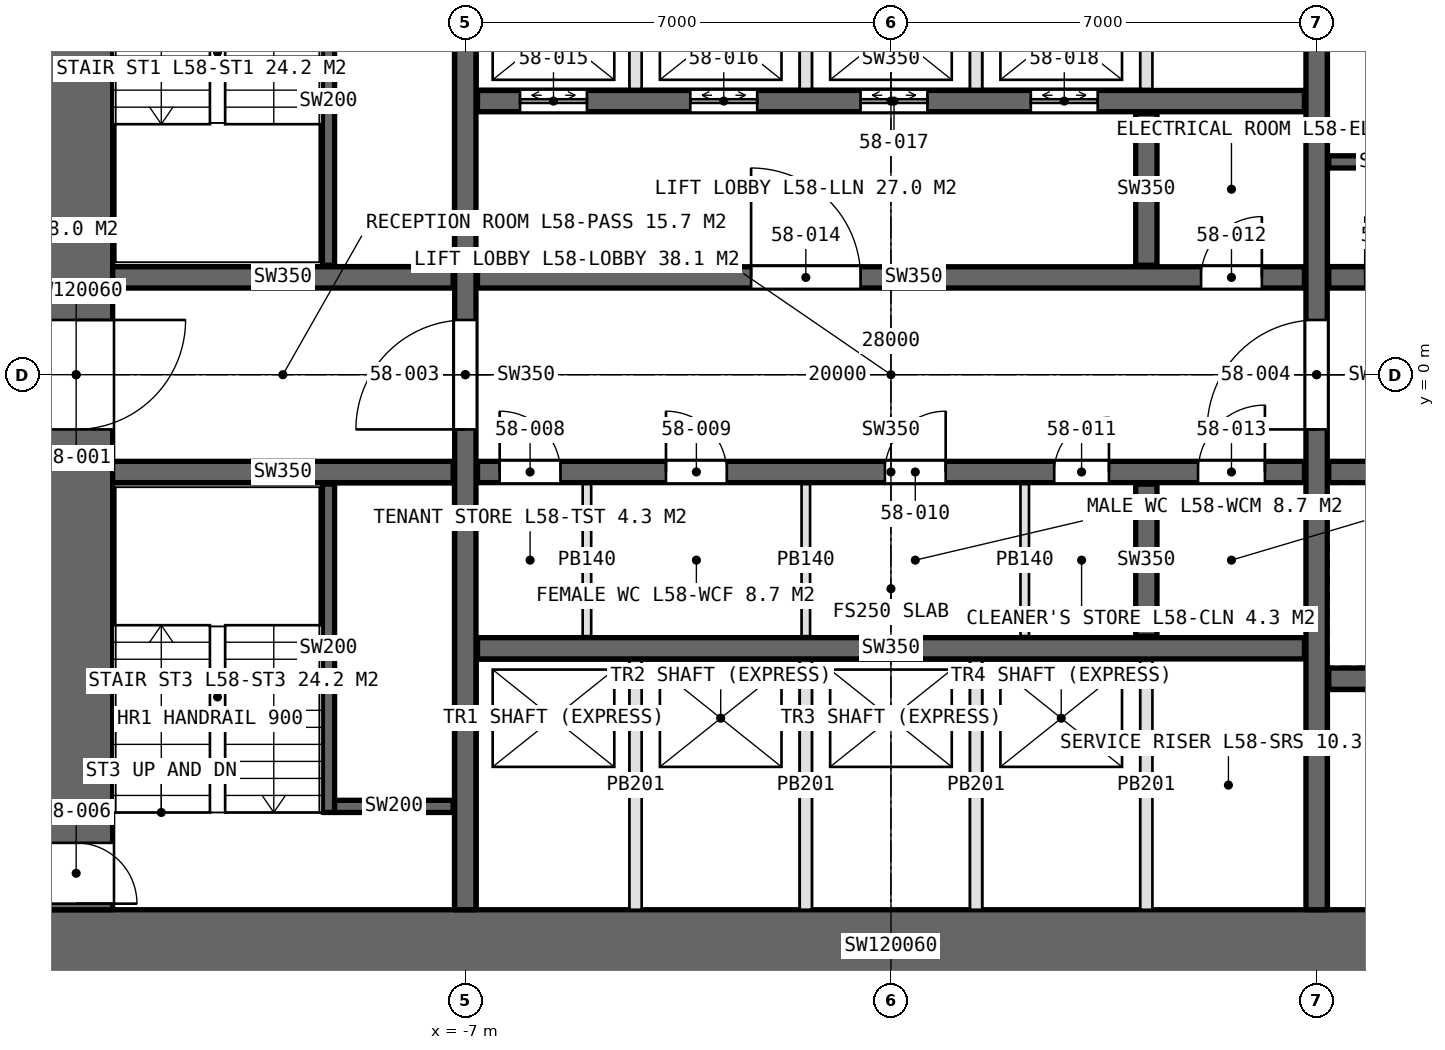
"""IFC4 building model, lengths in metres.
Left out: names, types, materials, properties, quantities, classifications, styles, units other than length and angle.
Written with IfcOpenShell. Run it as: python <this file> out.ifc"""

import sys

from ifc_helpers import new_model, si_unit, direction, frame, frame_2d, origin, place, context, subcontext, project, spatial, rectangle, extrude, element, fill, save


model = new_model("IFC4")
c1 = context("Model", 3, precision=1e-05, world=origin(), true_north=direction((0.0, 1.0)))
c2 = subcontext(c1, "Body", "Model", "MODEL_VIEW")
j1 = project(units=[si_unit("LENGTHUNIT", "METRE"), si_unit("PLANEANGLEUNIT", "RADIAN")], contexts=[c1])
p1 = place(None, origin())
s1 = spatial("IfcSite", under=j1, at=p1, CompositionType="ELEMENT")
p2 = place(p1, origin())
s2 = spatial("IfcBuilding", under=s1, at=p2, CompositionType="ELEMENT")
p3 = place(p2, frame((0.0, 0.0, 262.0)))
s3 = spatial("IfcBuildingStorey", under=s2, at=p3, CompositionType="ELEMENT", Elevation=262.0)
p4 = place(p3, frame((-14.0, -9.4, 0.0), z_axis=(0.0, 0.0, 1.0), x_axis=(1.0, 0.0, 0.0)))
e1 = element("IfcWall", 1, at=p4, inside=s3, PredefinedType="SHEAR", context=c2, shape_type="SweptSolid", body=[
    extrude(rectangle(XDim=28.0, YDim=1.2, at=frame_2d((14.0, 0.0))), origin(), (0.0, 0.0, 1.0), 4.2),
])
p5 = place(p4, frame((22.9, 0.0, 0.0)))
e2 = element("IfcOpeningElement", 2, at=p5, cuts=e1, PredefinedType="OPENING", context=c2, shape_type="SweptSolid", body=[
    extrude(rectangle(XDim=2.2, YDim=2.7, at=frame_2d((1.1, 1.35))), frame((0.0, 0.61, 0.0), z_axis=(0.0, -1.0, 0.0), x_axis=(1.0, 0.0, 0.0)), (0.0, 0.0, 1.0), 1.22),
])
p6 = place(p3, frame((-13.4, 8.8, 0.0), z_axis=(0.0, 0.0, 1.0), x_axis=(0.0, -1.0, 0.0)))
e3 = element("IfcWall", 3, at=p6, inside=s3, PredefinedType="SHEAR", context=c2, shape_type="SweptSolid", body=[
    extrude(rectangle(XDim=17.6, YDim=1.2, at=frame_2d((8.8, 0.0))), origin(), (0.0, 0.0, 1.0), 4.2),
])
p7 = place(p6, frame((7.9, 0.0, 0.0)))
e4 = element("IfcOpeningElement", 4, at=p7, cuts=e3, PredefinedType="OPENING", context=c2, shape_type="SweptSolid", body=[
    extrude(rectangle(XDim=1.8, YDim=2.4, at=frame_2d((0.9, 1.2))), frame((0.0, 0.61, 0.0), z_axis=(0.0, -1.0, 0.0), x_axis=(1.0, 0.0, 0.0)), (0.0, 0.0, 1.0), 1.22),
])
p8 = place(p6, frame((16.5, 0.0, 0.0)))
e5 = element("IfcOpeningElement", 5, at=p8, cuts=e3, PredefinedType="OPENING", context=c2, shape_type="SweptSolid", body=[
    extrude(rectangle(XDim=1.0, YDim=2.4, at=frame_2d((0.5, 1.2))), frame((0.0, 0.61, 0.0), z_axis=(0.0, -1.0, 0.0), x_axis=(1.0, 0.0, 0.0)), (0.0, 0.0, 1.0), 1.22),
])
p9 = place(p3, frame((-7.0, -8.8, 0.0), z_axis=(0.0, 0.0, 1.0), x_axis=(0.0, 1.0, 0.0)))
e6 = element("IfcWall", 6, at=p9, inside=s3, PredefinedType="SHEAR", context=c2, shape_type="SweptSolid", body=[
    extrude(rectangle(XDim=17.6, YDim=0.35, at=frame_2d((8.8, 0.0))), origin(), (0.0, 0.0, 1.0), 4.2),
])
p10 = place(p9, frame((7.9, 0.0, 0.0)))
e7 = element("IfcOpeningElement", 7, at=p10, cuts=e6, PredefinedType="OPENING", context=c2, shape_type="SweptSolid", body=[
    extrude(rectangle(XDim=1.8, YDim=2.4, at=frame_2d((0.9, 1.2))), frame((0.0, 0.185, 0.0), z_axis=(0.0, -1.0, 0.0), x_axis=(1.0, 0.0, 0.0)), (0.0, 0.0, 1.0), 0.37),
])
p11 = place(p3, frame((7.0, -8.8, 0.0), z_axis=(0.0, 0.0, 1.0), x_axis=(0.0, 1.0, 0.0)))
e8 = element("IfcWall", 8, at=p11, inside=s3, PredefinedType="SHEAR", context=c2, shape_type="SweptSolid", body=[
    extrude(rectangle(XDim=17.6, YDim=0.35, at=frame_2d((8.8, 0.0))), origin(), (0.0, 0.0, 1.0), 4.2),
])
p12 = place(p11, frame((7.9, 0.0, 0.0)))
e9 = element("IfcOpeningElement", 9, at=p12, cuts=e8, PredefinedType="OPENING", context=c2, shape_type="SweptSolid", body=[
    extrude(rectangle(XDim=1.8, YDim=2.4, at=frame_2d((0.9, 1.2))), frame((0.0, 0.185, 0.0), z_axis=(0.0, -1.0, 0.0), x_axis=(1.0, 0.0, 0.0)), (0.0, 0.0, 1.0), 0.37),
])
p13 = place(p3, frame((-6.8, 1.6, 0.0), z_axis=(0.0, 0.0, 1.0), x_axis=(1.0, 0.0, 0.0)))
e10 = element("IfcWall", 10, at=p13, inside=s3, PredefinedType="SHEAR", context=c2, shape_type="SweptSolid", body=[
    extrude(rectangle(XDim=13.6, YDim=0.35, at=frame_2d((6.8, 0.0))), origin(), (0.0, 0.0, 1.0), 4.2),
])
p14 = place(p13, frame((11.9, 0.0, 0.0)))
e11 = element("IfcOpeningElement", 11, at=p14, cuts=e10, PredefinedType="OPENING", context=c2, shape_type="SweptSolid", body=[
    extrude(rectangle(XDim=1.0, YDim=2.4, at=frame_2d((0.5, 1.2))), frame((0.0, 0.185, 0.0), z_axis=(0.0, -1.0, 0.0), x_axis=(1.0, 0.0, 0.0)), (0.0, 0.0, 1.0), 0.37),
])
p15 = place(p13, frame((4.5, 0.0, 0.0)))
e12 = element("IfcOpeningElement", 12, at=p15, cuts=e10, PredefinedType="OPENING", context=c2, shape_type="SweptSolid", body=[
    extrude(rectangle(XDim=1.8, YDim=2.4, at=frame_2d((0.9, 1.2))), frame((0.0, 0.185, 0.0), z_axis=(0.0, -1.0, 0.0), x_axis=(1.0, 0.0, 0.0)), (0.0, 0.0, 1.0), 0.37),
])
p16 = place(p3, frame((-6.8, -1.6, 0.0), z_axis=(0.0, 0.0, 1.0), x_axis=(1.0, 0.0, 0.0)))
e13 = element("IfcWall", 13, at=p16, inside=s3, PredefinedType="SHEAR", context=c2, shape_type="SweptSolid", body=[
    extrude(rectangle(XDim=13.6, YDim=0.35, at=frame_2d((6.8, 0.0))), origin(), (0.0, 0.0, 1.0), 4.2),
])
p17 = place(p16, frame((0.365, 0.0, 0.0)))
e14 = element("IfcOpeningElement", 14, at=p17, cuts=e13, PredefinedType="OPENING", context=c2, shape_type="SweptSolid", body=[
    extrude(rectangle(XDim=1.0, YDim=2.4, at=frame_2d((0.5, 1.2))), frame((0.0, 0.185, 0.0), z_axis=(0.0, -1.0, 0.0), x_axis=(1.0, 0.0, 0.0)), (0.0, 0.0, 1.0), 0.37),
])
p18 = place(p16, frame((3.1, 0.0, 0.0)))
e15 = element("IfcOpeningElement", 15, at=p18, cuts=e13, PredefinedType="OPENING", context=c2, shape_type="SweptSolid", body=[
    extrude(rectangle(XDim=1.0, YDim=2.4, at=frame_2d((0.5, 1.2))), frame((0.0, 0.185, 0.0), z_axis=(0.0, -1.0, 0.0), x_axis=(1.0, 0.0, 0.0)), (0.0, 0.0, 1.0), 0.37),
])
p19 = place(p16, frame((6.7, 0.0, 0.0)))
e16 = element("IfcOpeningElement", 16, at=p19, cuts=e13, PredefinedType="OPENING", context=c2, shape_type="SweptSolid", body=[
    extrude(rectangle(XDim=1.0, YDim=2.4, at=frame_2d((0.5, 1.2))), frame((0.0, 0.185, 0.0), z_axis=(0.0, -1.0, 0.0), x_axis=(1.0, 0.0, 0.0)), (0.0, 0.0, 1.0), 0.37),
])
p20 = place(p16, frame((9.485, 0.0, 0.0)))
e17 = element("IfcOpeningElement", 17, at=p20, cuts=e13, PredefinedType="OPENING", context=c2, shape_type="SweptSolid", body=[
    extrude(rectangle(XDim=0.9, YDim=2.4, at=frame_2d((0.45, 1.2))), frame((0.0, 0.185, 0.0), z_axis=(0.0, -1.0, 0.0), x_axis=(1.0, 0.0, 0.0)), (0.0, 0.0, 1.0), 0.37),
])
p21 = place(p16, frame((11.85, 0.0, 0.0)))
e18 = element("IfcOpeningElement", 18, at=p21, cuts=e13, PredefinedType="OPENING", context=c2, shape_type="SweptSolid", body=[
    extrude(rectangle(XDim=1.1, YDim=2.4, at=frame_2d((0.55, 1.2))), frame((0.0, 0.185, 0.0), z_axis=(0.0, -1.0, 0.0), x_axis=(1.0, 0.0, 0.0)), (0.0, 0.0, 1.0), 0.37),
])
p22 = place(p3, frame((-6.8, 4.5, 0.0), z_axis=(0.0, 0.0, 1.0), x_axis=(1.0, 0.0, 0.0)))
e19 = element("IfcWall", 19, at=p22, inside=s3, PredefinedType="SHEAR", context=c2, shape_type="SweptSolid", body=[
    extrude(rectangle(XDim=13.6, YDim=0.35, at=frame_2d((6.8, 0.0))), origin(), (0.0, 0.0, 1.0), 4.2),
])
p23 = place(p22, frame((0.7, 0.0, 0.0)))
e20 = element("IfcOpeningElement", 20, at=p23, cuts=e19, PredefinedType="OPENING", context=c2, shape_type="SweptSolid", body=[
    extrude(rectangle(XDim=1.1, YDim=2.4, at=frame_2d((0.55, 1.2))), frame((0.0, 0.185, 0.0), z_axis=(0.0, -1.0, 0.0), x_axis=(1.0, 0.0, 0.0)), (0.0, 0.0, 1.0), 0.37),
])
p24 = place(p22, frame((3.5, 0.0, 0.0)))
e21 = element("IfcOpeningElement", 21, at=p24, cuts=e19, PredefinedType="OPENING", context=c2, shape_type="SweptSolid", body=[
    extrude(rectangle(XDim=1.1, YDim=2.4, at=frame_2d((0.55, 1.2))), frame((0.0, 0.185, 0.0), z_axis=(0.0, -1.0, 0.0), x_axis=(1.0, 0.0, 0.0)), (0.0, 0.0, 1.0), 0.37),
])
p25 = place(p22, frame((6.3, 0.0, 0.0)))
e22 = element("IfcOpeningElement", 22, at=p25, cuts=e19, PredefinedType="OPENING", context=c2, shape_type="SweptSolid", body=[
    extrude(rectangle(XDim=1.1, YDim=2.4, at=frame_2d((0.55, 1.2))), frame((0.0, 0.185, 0.0), z_axis=(0.0, -1.0, 0.0), x_axis=(1.0, 0.0, 0.0)), (0.0, 0.0, 1.0), 0.37),
])
p26 = place(p22, frame((9.1, 0.0, 0.0)))
e23 = element("IfcOpeningElement", 23, at=p26, cuts=e19, PredefinedType="OPENING", context=c2, shape_type="SweptSolid", body=[
    extrude(rectangle(XDim=1.1, YDim=2.4, at=frame_2d((0.55, 1.2))), frame((0.0, 0.185, 0.0), z_axis=(0.0, -1.0, 0.0), x_axis=(1.0, 0.0, 0.0)), (0.0, 0.0, 1.0), 0.37),
])
p27 = place(p3, frame((-6.8, -4.5, 0.0), z_axis=(0.0, 0.0, 1.0), x_axis=(1.0, 0.0, 0.0)))
e24 = element("IfcWall", 24, at=p27, inside=s3, PredefinedType="SHEAR", context=c2, shape_type="SweptSolid", body=[
    extrude(rectangle(XDim=13.6, YDim=0.35, at=frame_2d((6.8, 0.0))), origin(), (0.0, 0.0, 1.0), 4.2),
])
for number, where, z_axis, x_axis in (
    (25, (-12.8, 1.6, 0.0), (0.0, 0.0, 1.0), (1.0, 0.0, 0.0)),
    (26, (-12.8, -1.6, 0.0), (0.0, 0.0, 1.0), (1.0, 0.0, 0.0)),
):
    element("IfcWall", number, at=place(p3, frame(where, z_axis=z_axis, x_axis=x_axis)), inside=s3, PredefinedType="SHEAR", context=c2, shape_type="SweptSolid", body=[
        extrude(rectangle(XDim=5.6, YDim=0.35, at=frame_2d((2.8, 0.0))), origin(), (0.0, 0.0, 1.0), 4.2),
    ])
p28 = place(p3, frame((7.2, 1.6, 0.0), z_axis=(0.0, 0.0, 1.0), x_axis=(1.0, 0.0, 0.0)))
e27 = element("IfcWall", 27, at=p28, inside=s3, PredefinedType="SHEAR", context=c2, shape_type="SweptSolid", body=[
    extrude(rectangle(XDim=5.6, YDim=0.35, at=frame_2d((2.8, 0.0))), origin(), (0.0, 0.0, 1.0), 4.2),
])
p29 = place(p28, frame((0.6, 0.0, 0.0)))
e28 = element("IfcOpeningElement", 28, at=p29, cuts=e27, PredefinedType="OPENING", context=c2, shape_type="SweptSolid", body=[
    extrude(rectangle(XDim=1.0, YDim=2.4, at=frame_2d((0.5, 1.2))), frame((0.0, 0.185, 0.0), z_axis=(0.0, -1.0, 0.0), x_axis=(1.0, 0.0, 0.0)), (0.0, 0.0, 1.0), 0.37),
])
p30 = place(p3, frame((7.2, -1.6, 0.0), z_axis=(0.0, 0.0, 1.0), x_axis=(1.0, 0.0, 0.0)))
e29 = element("IfcWall", 29, at=p30, inside=s3, PredefinedType="SHEAR", context=c2, shape_type="SweptSolid", body=[
    extrude(rectangle(XDim=5.6, YDim=0.35, at=frame_2d((2.8, 0.0))), origin(), (0.0, 0.0, 1.0), 4.2),
])
p31 = place(p30, frame((0.9, 0.0, 0.0)))
e30 = element("IfcOpeningElement", 30, at=p31, cuts=e29, PredefinedType="OPENING", context=c2, shape_type="SweptSolid", body=[
    extrude(rectangle(XDim=1.3, YDim=2.4, at=frame_2d((0.65, 1.2))), frame((0.0, 0.185, 0.0), z_axis=(0.0, -1.0, 0.0), x_axis=(1.0, 0.0, 0.0)), (0.0, 0.0, 1.0), 0.37),
])
p32 = place(p30, frame((3.9, 0.0, 0.0)))
e31 = element("IfcOpeningElement", 31, at=p32, cuts=e29, PredefinedType="OPENING", context=c2, shape_type="SweptSolid", body=[
    extrude(rectangle(XDim=1.3, YDim=2.4, at=frame_2d((0.65, 1.2))), frame((0.0, 0.185, 0.0), z_axis=(0.0, -1.0, 0.0), x_axis=(1.0, 0.0, 0.0)), (0.0, 0.0, 1.0), 0.37),
])
p33 = place(p3, frame((7.2, -5.0, 0.0), z_axis=(0.0, 0.0, 1.0), x_axis=(1.0, 0.0, 0.0)))
e32 = element("IfcWall", 32, at=p33, inside=s3, PredefinedType="SHEAR", context=c2, shape_type="SweptSolid", body=[
    extrude(rectangle(XDim=5.6, YDim=0.35, at=frame_2d((2.8, 0.0))), origin(), (0.0, 0.0, 1.0), 4.2),
])
for number, where, z_axis, x_axis in (
    (33, (4.2, 1.8, 0.0), (0.0, 0.0, 1.0), (0.0, 1.0, 0.0)),
    (34, (4.2, -4.3, 0.0), (0.0, 0.0, 1.0), (0.0, 1.0, 0.0)),
):
    element("IfcWall", number, at=place(p3, frame(where, z_axis=z_axis, x_axis=x_axis)), inside=s3, PredefinedType="SHEAR", context=c2, shape_type="SweptSolid", body=[
        extrude(rectangle(XDim=2.5, YDim=0.35, at=frame_2d((1.25, 0.0))), origin(), (0.0, 0.0, 1.0), 4.2),
    ])
for number, where, z_axis, x_axis in (
    (35, (-5.0, -1.8, 0.0), (0.0, 0.0, 1.0), (0.0, -1.0, 0.0)),
    (36, (-1.4, -1.8, 0.0), (0.0, 0.0, 1.0), (0.0, -1.0, 0.0)),
    (37, (2.2, -1.8, 0.0), (0.0, 0.0, 1.0), (0.0, -1.0, 0.0)),
):
    element("IfcWall", number, at=place(p3, frame(where, z_axis=z_axis, x_axis=x_axis)), inside=s3, PredefinedType="PARTITIONING", context=c2, shape_type="SweptSolid", body=[
        extrude(rectangle(XDim=2.5, YDim=0.14, at=frame_2d((1.25, 0.0))), origin(), (0.0, 0.0, 1.0), 3.95),
    ])
for number, where, z_axis, x_axis in (
    (38, (-4.2, 4.7, 0.0), (0.0, 0.0, 1.0), (0.0, 1.0, 0.0)),
    (39, (-1.4, 4.7, 0.0), (0.0, 0.0, 1.0), (0.0, 1.0, 0.0)),
    (40, (1.4, 4.7, 0.0), (0.0, 0.0, 1.0), (0.0, 1.0, 0.0)),
    (41, (4.2, 4.7, 0.0), (0.0, 0.0, 1.0), (0.0, 1.0, 0.0)),
    (42, (-4.2, -4.7, 0.0), (0.0, 0.0, 1.0), (0.0, -1.0, 0.0)),
    (43, (-1.4, -4.7, 0.0), (0.0, 0.0, 1.0), (0.0, -1.0, 0.0)),
    (44, (1.4, -4.7, 0.0), (0.0, 0.0, 1.0), (0.0, -1.0, 0.0)),
    (45, (4.2, -4.7, 0.0), (0.0, 0.0, 1.0), (0.0, -1.0, 0.0)),
):
    element("IfcWall", number, at=place(p3, frame(where, z_axis=z_axis, x_axis=x_axis)), inside=s3, PredefinedType="PARTITIONING", context=c2, shape_type="SweptSolid", body=[
        extrude(rectangle(XDim=4.1, YDim=0.2, at=frame_2d((2.05, 0.0))), origin(), (0.0, 0.0, 1.0), 4.2),
    ])
for number, where, z_axis, x_axis in (
    (46, (-9.25, 7.2, 0.0), (0.0, 0.0, 1.0), (0.0, -1.0, 0.0)),
    (47, (-9.25, -7.2, 0.0), (0.0, 0.0, 1.0), (0.0, 1.0, 0.0)),
):
    element("IfcWall", number, at=place(p3, frame(where, z_axis=z_axis, x_axis=x_axis)), inside=s3, PredefinedType="SOLIDWALL", context=c2, shape_type="SweptSolid", body=[
        extrude(rectangle(XDim=5.4, YDim=0.2, at=frame_2d((2.7, 0.0))), origin(), (0.0, 0.0, 1.0), 4.2),
    ])
for number, where, z_axis, x_axis in (
    (48, (-9.15, -7.1, 0.0), (0.0, 0.0, 1.0), (1.0, 0.0, 0.0)),
    (49, (9.15, 3.5, 0.0), (0.0, 0.0, 1.0), (-1.0, 0.0, 0.0)),
):
    element("IfcWall", number, at=place(p3, frame(where, z_axis=z_axis, x_axis=x_axis)), inside=s3, PredefinedType="SOLIDWALL", context=c2, shape_type="SweptSolid", body=[
        extrude(rectangle(XDim=1.95, YDim=0.2, at=frame_2d((0.975, 0.0))), origin(), (0.0, 0.0, 1.0), 4.2),
    ])
p34 = place(p7, origin())
e50 = element("IfcDoor", 50, at=p34, inside=s3, OperationType="DOUBLE_DOOR_SINGLE_SWING", PredefinedType="DOOR", context=c2, shape_type="SweptSolid", body=[
    extrude(rectangle(XDim=1.8, YDim=2.4, at=frame_2d((0.9, 1.2))), frame((0.0, 0.025, 0.0), z_axis=(0.0, -1.0, 0.0), x_axis=(1.0, 0.0, 0.0)), (0.0, 0.0, 1.0), 0.05),
])
fill(e4, e50)
p35 = place(p10, origin())
e51 = element("IfcDoor", 51, at=p35, inside=s3, OperationType="DOUBLE_DOOR_SINGLE_SWING", PredefinedType="DOOR", context=c2, shape_type="SweptSolid", body=[
    extrude(rectangle(XDim=1.8, YDim=2.4, at=frame_2d((0.9, 1.2))), frame((0.0, 0.025, 0.0), z_axis=(0.0, -1.0, 0.0), x_axis=(1.0, 0.0, 0.0)), (0.0, 0.0, 1.0), 0.05),
])
fill(e7, e51)
p36 = place(p12, origin())
e52 = element("IfcDoor", 52, at=p36, inside=s3, OperationType="DOUBLE_DOOR_SINGLE_SWING", PredefinedType="DOOR", context=c2, shape_type="SweptSolid", body=[
    extrude(rectangle(XDim=1.8, YDim=2.4, at=frame_2d((0.9, 1.2))), frame((0.0, 0.025, 0.0), z_axis=(0.0, -1.0, 0.0), x_axis=(1.0, 0.0, 0.0)), (0.0, 0.0, 1.0), 0.05),
])
fill(e9, e52)
p37 = place(p8, origin())
e53 = element("IfcDoor", 53, at=p37, inside=s3, OperationType="SINGLE_SWING_RIGHT", PredefinedType="DOOR", context=c2, shape_type="SweptSolid", body=[
    extrude(rectangle(XDim=1.0, YDim=2.4, at=frame_2d((0.5, 1.2))), frame((0.0, 0.025, 0.0), z_axis=(0.0, -1.0, 0.0), x_axis=(1.0, 0.0, 0.0)), (0.0, 0.0, 1.0), 0.05),
])
fill(e5, e53)
p38 = place(p17, origin())
e54 = element("IfcDoor", 54, at=p38, inside=s3, OperationType="SINGLE_SWING_LEFT", PredefinedType="DOOR", context=c2, shape_type="SweptSolid", body=[
    extrude(rectangle(XDim=1.0, YDim=2.4, at=frame_2d((0.5, 1.2))), frame((0.0, 0.025, 0.0), z_axis=(0.0, -1.0, 0.0), x_axis=(1.0, 0.0, 0.0)), (0.0, 0.0, 1.0), 0.05),
])
fill(e14, e54)
p39 = place(p18, origin())
e55 = element("IfcDoor", 55, at=p39, inside=s3, OperationType="SINGLE_SWING_LEFT", PredefinedType="DOOR", context=c2, shape_type="SweptSolid", body=[
    extrude(rectangle(XDim=1.0, YDim=2.4, at=frame_2d((0.5, 1.2))), frame((0.0, 0.025, 0.0), z_axis=(0.0, -1.0, 0.0), x_axis=(1.0, 0.0, 0.0)), (0.0, 0.0, 1.0), 0.05),
])
fill(e15, e55)
p40 = place(p19, origin())
e56 = element("IfcDoor", 56, at=p40, inside=s3, OperationType="SINGLE_SWING_RIGHT", PredefinedType="DOOR", context=c2, shape_type="SweptSolid", body=[
    extrude(rectangle(XDim=1.0, YDim=2.4, at=frame_2d((0.5, 1.2))), frame((0.0, 0.025, 0.0), z_axis=(0.0, -1.0, 0.0), x_axis=(1.0, 0.0, 0.0)), (0.0, 0.0, 1.0), 0.05),
])
fill(e16, e56)
p41 = place(p20, origin())
e57 = element("IfcDoor", 57, at=p41, inside=s3, OperationType="SINGLE_SWING_RIGHT", PredefinedType="DOOR", context=c2, shape_type="SweptSolid", body=[
    extrude(rectangle(XDim=0.9, YDim=2.4, at=frame_2d((0.45, 1.2))), frame((0.0, 0.025, 0.0), z_axis=(0.0, -1.0, 0.0), x_axis=(1.0, 0.0, 0.0)), (0.0, 0.0, 1.0), 0.05),
])
fill(e17, e57)
p42 = place(p14, origin())
e58 = element("IfcDoor", 58, at=p42, inside=s3, OperationType="SINGLE_SWING_RIGHT", PredefinedType="DOOR", context=c2, shape_type="SweptSolid", body=[
    extrude(rectangle(XDim=1.0, YDim=2.4, at=frame_2d((0.5, 1.2))), frame((0.0, 0.025, 0.0), z_axis=(0.0, -1.0, 0.0), x_axis=(1.0, 0.0, 0.0)), (0.0, 0.0, 1.0), 0.05),
])
fill(e11, e58)
p43 = place(p21, origin())
e59 = element("IfcDoor", 59, at=p43, inside=s3, OperationType="SINGLE_SWING_RIGHT", PredefinedType="DOOR", context=c2, shape_type="SweptSolid", body=[
    extrude(rectangle(XDim=1.1, YDim=2.4, at=frame_2d((0.55, 1.2))), frame((0.0, 0.025, 0.0), z_axis=(0.0, -1.0, 0.0), x_axis=(1.0, 0.0, 0.0)), (0.0, 0.0, 1.0), 0.05),
])
fill(e18, e59)
p44 = place(p15, origin())
e60 = element("IfcDoor", 60, at=p44, inside=s3, OperationType="DOUBLE_DOOR_SINGLE_SWING", PredefinedType="DOOR", context=c2, shape_type="SweptSolid", body=[
    extrude(rectangle(XDim=1.8, YDim=2.4, at=frame_2d((0.9, 1.2))), frame((0.0, 0.025, 0.0), z_axis=(0.0, -1.0, 0.0), x_axis=(1.0, 0.0, 0.0)), (0.0, 0.0, 1.0), 0.05),
])
fill(e12, e60)
p45 = place(p23, origin())
e61 = element("IfcDoor", 61, at=p45, inside=s3, OperationType="DOUBLE_DOOR_SLIDING", PredefinedType="DOOR", context=c2, shape_type="SweptSolid", body=[
    extrude(rectangle(XDim=1.1, YDim=2.4, at=frame_2d((0.55, 1.2))), frame((0.0, 0.025, 0.0), z_axis=(0.0, -1.0, 0.0), x_axis=(1.0, 0.0, 0.0)), (0.0, 0.0, 1.0), 0.05),
])
fill(e20, e61)
p46 = place(p24, origin())
e62 = element("IfcDoor", 62, at=p46, inside=s3, OperationType="DOUBLE_DOOR_SLIDING", PredefinedType="DOOR", context=c2, shape_type="SweptSolid", body=[
    extrude(rectangle(XDim=1.1, YDim=2.4, at=frame_2d((0.55, 1.2))), frame((0.0, 0.025, 0.0), z_axis=(0.0, -1.0, 0.0), x_axis=(1.0, 0.0, 0.0)), (0.0, 0.0, 1.0), 0.05),
])
fill(e21, e62)
p47 = place(p25, origin())
e63 = element("IfcDoor", 63, at=p47, inside=s3, OperationType="DOUBLE_DOOR_SLIDING", PredefinedType="DOOR", context=c2, shape_type="SweptSolid", body=[
    extrude(rectangle(XDim=1.1, YDim=2.4, at=frame_2d((0.55, 1.2))), frame((0.0, 0.025, 0.0), z_axis=(0.0, -1.0, 0.0), x_axis=(1.0, 0.0, 0.0)), (0.0, 0.0, 1.0), 0.05),
])
fill(e22, e63)
p48 = place(p26, origin())
e64 = element("IfcDoor", 64, at=p48, inside=s3, OperationType="DOUBLE_DOOR_SLIDING", PredefinedType="DOOR", context=c2, shape_type="SweptSolid", body=[
    extrude(rectangle(XDim=1.1, YDim=2.4, at=frame_2d((0.55, 1.2))), frame((0.0, 0.025, 0.0), z_axis=(0.0, -1.0, 0.0), x_axis=(1.0, 0.0, 0.0)), (0.0, 0.0, 1.0), 0.05),
])
fill(e23, e64)
save(model, sys.argv[1])
